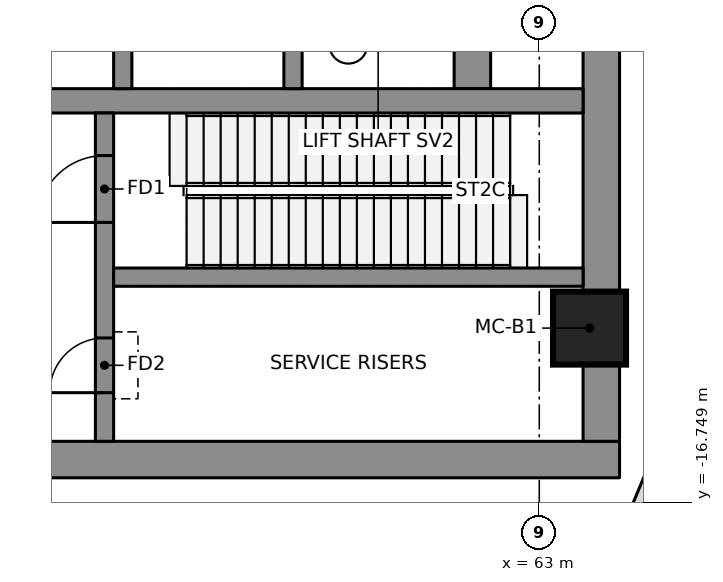
"""IFC4 building model, lengths in metres.
Left out: names, types, materials, properties, quantities, classifications, styles, units other than length and angle.
Written with IfcOpenShell. Run it as: python <this file> out.ifc"""

import sys

from ifc_helpers import new_model, si_unit, direction, frame, frame_2d, origin, origin_2d, place, context, subcontext, project, spatial, polyline, rectangle, outline, extrude, element, fill, save


model = new_model("IFC4")
c1 = context("Model", 3, precision=1e-05, world=origin(), true_north=direction((0.0, 1.0)))
c2 = subcontext(c1, "Body", "Model", "MODEL_VIEW")
j1 = project(units=[si_unit("LENGTHUNIT", "METRE"), si_unit("PLANEANGLEUNIT", "RADIAN")], contexts=[c1])
p1 = place(None, origin())
s1 = spatial("IfcSite", under=j1, at=p1, CompositionType="ELEMENT")
p2 = place(p1, origin())
s2 = spatial("IfcBuilding", under=s1, at=p2, CompositionType="ELEMENT")
p3 = place(p2, frame((0.0, 0.0, 256.3)))
s3 = spatial("IfcBuildingStorey", under=s2, at=p3, CompositionType="ELEMENT", Elevation=256.3)
p4 = place(p3, frame((50.7, -16.05, 0.0), z_axis=(0.0, 0.0, 1.0), x_axis=(1.0, 0.0, 0.0)))
e1 = element("IfcWall", 1, at=p4, inside=s3, PredefinedType="SHEAR", context=c2, shape_type="SweptSolid", body=[
    extrude(rectangle(XDim=13.62, YDim=0.6, at=frame_2d((6.81, 0.0))), origin(), (0.0, 0.0, 1.0), 7.0),
])
p5 = place(p3, frame((64.02, -15.75, 0.0), z_axis=(0.0, 0.0, 1.0), x_axis=(0.0, 1.0, 0.0)))
e2 = element("IfcWall", 2, at=p5, inside=s3, PredefinedType="SHEAR", context=c2, shape_type="SweptSolid", body=[
    extrude(rectangle(XDim=8.248, YDim=0.6, at=frame_2d((4.124, 0.0))), origin(), (0.0, 0.0, 1.0), 7.0),
])
p6 = place(p3, frame((61.9, -9.95, 0.0), z_axis=(0.0, 0.0, 1.0), x_axis=(0.0, 1.0, 0.0)))
e3 = element("IfcWall", 3, at=p6, inside=s3, PredefinedType="SHEAR", context=c2, shape_type="SweptSolid", body=[
    extrude(rectangle(XDim=19.9, YDim=0.6, at=frame_2d((9.95, 0.0))), origin(), (0.0, 0.0, 1.0), 7.0),
])
p7 = place(p3, frame((50.7, -10.15, 0.0), z_axis=(0.0, 0.0, 1.0), x_axis=(1.0, 0.0, 0.0)))
e4 = element("IfcWall", 4, at=p7, inside=s3, PredefinedType="SHEAR", context=c2, shape_type="SweptSolid", body=[
    extrude(rectangle(XDim=13.02, YDim=0.4, at=frame_2d((6.51, 0.0))), origin(), (0.0, 0.0, 1.0), 7.0),
])
for number, where, z_axis, x_axis in (
    (5, (56.15, -9.95, 0.0), (0.0, 0.0, 1.0), (0.0, 1.0, 0.0)),
    (6, (58.95, -9.95, 0.0), (0.0, 0.0, 1.0), (0.0, 1.0, 0.0)),
):
    element("IfcWall", number, at=place(p3, frame(where, z_axis=z_axis, x_axis=x_axis)), inside=s3, PredefinedType="SHEAR", context=c2, shape_type="SweptSolid", body=[
        extrude(rectangle(XDim=3.0, YDim=0.3, at=frame_2d((1.5, 0.0))), origin(), (0.0, 0.0, 1.0), 7.0),
    ])
p8 = place(p3, frame((55.85, -15.75, 0.0), z_axis=(0.0, 0.0, 1.0), x_axis=(0.0, 1.0, 0.0)))
e7 = element("IfcWall", 7, at=p8, inside=s3, PredefinedType="SHEAR", context=c2, shape_type="SweptSolid", body=[
    extrude(rectangle(XDim=5.4, YDim=0.3, at=frame_2d((2.7, 0.0))), origin(), (0.0, 0.0, 1.0), 7.0),
])
p9 = place(p8, frame((3.6, 0.0, 0.0)))
e8 = element("IfcOpeningElement", 8, at=p9, cuts=e7, PredefinedType="OPENING", context=c2, shape_type="SweptSolid", body=[
    extrude(rectangle(XDim=1.1, YDim=2.1, at=frame_2d((0.55, 1.05))), frame((0.0, 0.16, 0.0), z_axis=(0.0, -1.0, 0.0), x_axis=(1.0, 0.0, 0.0)), (0.0, 0.0, 1.0), 0.32),
])
p10 = place(p8, frame((0.8, 0.0, 0.0)))
e9 = element("IfcOpeningElement", 9, at=p10, cuts=e7, PredefinedType="OPENING", context=c2, shape_type="SweptSolid", body=[
    extrude(rectangle(XDim=0.9, YDim=2.1, at=frame_2d((0.45, 1.05))), frame((0.0, 0.16, 0.0), z_axis=(0.0, -1.0, 0.0), x_axis=(1.0, 0.0, 0.0)), (0.0, 0.0, 1.0), 0.32),
])
p11 = place(p3, frame((56.0, -13.05, 0.0), z_axis=(0.0, 0.0, 1.0), x_axis=(1.0, 0.0, 0.0)))
e10 = element("IfcWall", 10, at=p11, inside=s3, PredefinedType="SHEAR", context=c2, shape_type="SweptSolid", body=[
    extrude(rectangle(XDim=7.72, YDim=0.3, at=frame_2d((3.86, 0.0))), origin(), (0.0, 0.0, 1.0), 7.0),
])
p12 = place(p3, frame((63.826, -13.888, 0.0), z_axis=(0.0, 0.0, 1.0), x_axis=(1.0, 0.0, 0.0)))
e11 = element("IfcColumn", 11, at=p12, inside=s3, PredefinedType="COLUMN", context=c2, shape_type="SweptSolid", body=[
    extrude(rectangle(XDim=1.2, YDim=1.2, at=origin_2d()), origin(), (0.0, 0.0, 1.0), 5.2),
])
p13 = place(p3, frame((63.471, -19.858, 0.0), z_axis=(0.0, 0.0, 1.0), x_axis=(0.3844335483, 0.923152667191, 0.0)))
e12 = element("IfcWall", 12, at=p13, inside=s3, PredefinedType="NOTDEFINED", context=c2, shape_type="SweptSolid", body=[
    extrude(outline(polyline([(-0.058, -0.2), (3.843, -0.2), (3.784, 0.2), (0.058, 0.2), (-0.058, -0.2)])), origin(), (0.0, 0.0, 1.0), 6.7),
])
p14 = place(p9, origin())
e13 = element("IfcDoor", 13, at=p14, inside=s3, OperationType="SINGLE_SWING_RIGHT", PredefinedType="DOOR", context=c2, shape_type="SweptSolid", body=[
    extrude(rectangle(XDim=1.1, YDim=2.1, at=frame_2d((0.55, 1.05))), frame((0.0, 0.025, 0.0), z_axis=(0.0, -1.0, 0.0), x_axis=(1.0, 0.0, 0.0)), (0.0, 0.0, 1.0), 0.05),
])
fill(e8, e13)
p15 = place(p10, origin())
e14 = element("IfcDoor", 14, at=p15, inside=s3, OperationType="SINGLE_SWING_LEFT", PredefinedType="DOOR", context=c2, shape_type="SweptSolid", body=[
    extrude(rectangle(XDim=0.9, YDim=2.1, at=frame_2d((0.45, 1.05))), frame((0.0, 0.025, 0.0), z_axis=(0.0, -1.0, 0.0), x_axis=(1.0, 0.0, 0.0)), (0.0, 0.0, 1.0), 0.05),
])
fill(e9, e14)
save(model, sys.argv[1])
